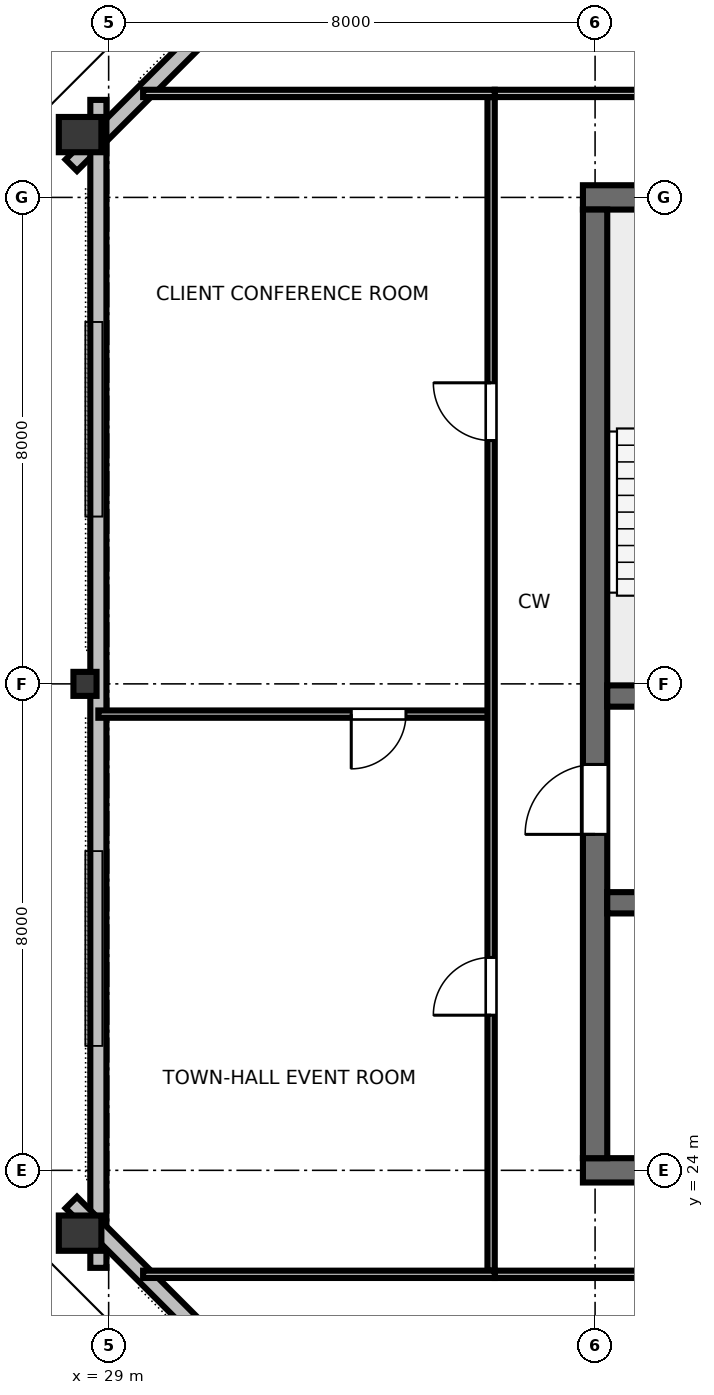
"""IFC4 building model, lengths in metres.
Left out: names, types, materials, properties, quantities, classifications, styles, units other than length and angle.
Written with IfcOpenShell. Run it as: python <this file> out.ifc"""

import sys

from ifc_helpers import new_model, si_unit, direction, frame, frame_2d, origin, origin_2d, place, context, subcontext, project, spatial, rectangle, hollow_rectangle, i_section, extrude, element, fill, save


model = new_model("IFC4")
c1 = context("Model", 3, precision=1e-05, world=origin(), true_north=direction((0.0, 1.0)))
c2 = subcontext(c1, "Body", "Model", "MODEL_VIEW")
j1 = project(units=[si_unit("LENGTHUNIT", "METRE"), si_unit("PLANEANGLEUNIT", "RADIAN")], contexts=[c1])
p1 = place(None, origin())
s1 = spatial("IfcSite", under=j1, at=p1, CompositionType="ELEMENT")
p2 = place(p1, origin())
s2 = spatial("IfcBuilding", under=s1, at=p2, CompositionType="ELEMENT")
p3 = place(p2, frame((0.0, 0.0, 271.8)))
s3 = spatial("IfcBuildingStorey", under=s2, at=p3, CompositionType="ELEMENT", Elevation=271.8)
p4 = place(p3, frame((36.8, 24.0, 0.0), z_axis=(0.0, 0.0, 1.0), x_axis=(1.0, 0.0, 0.0)))
e1 = element("IfcWall", 1, at=p4, inside=s3, PredefinedType="SHEAR", context=c2, shape_type="SweptSolid", body=[
    extrude(rectangle(XDim=18.4, YDim=0.4, at=frame_2d((9.2, 0.0))), origin(), (0.0, 0.0, 1.0), 3.36),
])
p5 = place(p4, frame((13.4, 0.0, 0.0)))
e2 = element("IfcOpeningElement", 2, at=p5, cuts=e1, PredefinedType="OPENING", context=c2, shape_type="SweptSolid", body=[
    extrude(rectangle(XDim=1.6, YDim=2.15, at=frame_2d((0.8, 1.075))), frame((0.0, 0.21, 0.0), z_axis=(0.0, -1.0, 0.0), x_axis=(1.0, 0.0, 0.0)), (0.0, 0.0, 1.0), 0.42),
])
p6 = place(p3, frame((36.8, 40.0, 0.0), z_axis=(0.0, 0.0, 1.0), x_axis=(1.0, 0.0, 0.0)))
e3 = element("IfcWall", 3, at=p6, inside=s3, PredefinedType="SHEAR", context=c2, shape_type="SweptSolid", body=[
    extrude(rectangle(XDim=18.4, YDim=0.4, at=frame_2d((9.2, 0.0))), origin(), (0.0, 0.0, 1.0), 3.36),
])
p7 = place(p6, frame((8.7, 0.0, 0.0)))
e4 = element("IfcOpeningElement", 4, at=p7, cuts=e3, PredefinedType="OPENING", context=c2, shape_type="SweptSolid", body=[
    extrude(rectangle(XDim=1.0, YDim=2.15, at=frame_2d((0.5, 1.075))), frame((0.0, 0.21, 0.0), z_axis=(0.0, -1.0, 0.0), x_axis=(1.0, 0.0, 0.0)), (0.0, 0.0, 1.0), 0.42),
])
p8 = place(p3, frame((37.0, 24.2, 0.0), z_axis=(0.0, 0.0, 1.0), x_axis=(0.0, 1.0, 0.0)))
e5 = element("IfcWall", 5, at=p8, inside=s3, PredefinedType="SHEAR", context=c2, shape_type="SweptSolid", body=[
    extrude(rectangle(XDim=15.6, YDim=0.4, at=frame_2d((7.8, 0.0))), origin(), (0.0, 0.0, 1.0), 3.36),
])
p9 = place(p8, frame((5.325, 0.0, 0.0)))
e6 = element("IfcOpeningElement", 6, at=p9, cuts=e5, PredefinedType="OPENING", context=c2, shape_type="SweptSolid", body=[
    extrude(rectangle(XDim=1.15, YDim=2.15, at=frame_2d((0.575, 1.075))), frame((0.0, 0.21, 0.0), z_axis=(0.0, -1.0, 0.0), x_axis=(1.0, 0.0, 0.0)), (0.0, 0.0, 1.0), 0.42),
])
p10 = place(p3, frame((37.2, 31.8, 0.0), z_axis=(0.0, 0.0, 1.0), x_axis=(1.0, 0.0, 0.0)))
e7 = element("IfcWall", 7, at=p10, inside=s3, PredefinedType="SHEAR", context=c2, shape_type="SweptSolid", body=[
    extrude(rectangle(XDim=17.6, YDim=0.35, at=frame_2d((8.8, 0.0))), origin(), (0.0, 0.0, 1.0), 3.36),
])
p11 = place(p10, frame((0.85, 0.0, 0.0)))
e8 = element("IfcOpeningElement", 8, at=p11, cuts=e7, PredefinedType="OPENING", context=c2, shape_type="SweptSolid", body=[
    extrude(rectangle(XDim=1.1, YDim=2.15, at=frame_2d((0.55, 1.075))), frame((0.0, 0.185, 0.0), z_axis=(0.0, -1.0, 0.0), x_axis=(1.0, 0.0, 0.0)), (0.0, 0.0, 1.0), 0.37),
])
p12 = place(p10, frame((14.75, 0.0, 0.0)))
e9 = element("IfcOpeningElement", 9, at=p12, cuts=e7, PredefinedType="OPENING", context=c2, shape_type="SweptSolid", body=[
    extrude(rectangle(XDim=1.1, YDim=2.15, at=frame_2d((0.55, 1.075))), frame((0.0, 0.185, 0.0), z_axis=(0.0, -1.0, 0.0), x_axis=(1.0, 0.0, 0.0)), (0.0, 0.0, 1.0), 0.37),
])
p13 = place(p3, frame((37.2, 28.4, 0.0), z_axis=(0.0, 0.0, 1.0), x_axis=(1.0, 0.0, 0.0)))
e10 = element("IfcWall", 10, at=p13, inside=s3, PredefinedType="SHEAR", context=c2, shape_type="SweptSolid", body=[
    extrude(rectangle(XDim=17.6, YDim=0.35, at=frame_2d((8.8, 0.0))), origin(), (0.0, 0.0, 1.0), 3.36),
])
p14 = place(p3, frame((28.531, 41.033, 0.0), z_axis=(0.0, 0.0, 1.0), x_axis=(0.0, 1.0, 0.0)))
e11 = element("IfcColumn", 11, at=p14, inside=s3, PredefinedType="COLUMN", context=c2, shape_type="SweptSolid", body=[
    extrude(hollow_rectangle(XDim=0.58, YDim=0.7, WallThickness=0.032, at=origin_2d()), origin(), (0.0, 0.0, 1.0), 3.373),
])
p15 = place(p3, frame((28.611, 32.0, 0.0), z_axis=(0.0, 0.0, 1.0), x_axis=(0.0, 1.0, 0.0)))
e12 = element("IfcColumn", 12, at=p15, inside=s3, PredefinedType="COLUMN", context=c2, shape_type="SweptSolid", body=[
    extrude(i_section(OverallWidth=0.395, OverallDepth=0.38, WebThickness=0.019, FlangeThickness=0.03, FilletRadius=0.025, at=origin_2d()), origin(), (0.0, 0.0, 1.0), 3.373),
])
p16 = place(p3, frame((28.531, 22.967, 0.0), z_axis=(0.0, 0.0, 1.0), x_axis=(0.0, 1.0, 0.0)))
e13 = element("IfcColumn", 13, at=p16, inside=s3, PredefinedType="COLUMN", context=c2, shape_type="SweptSolid", body=[
    extrude(hollow_rectangle(XDim=0.58, YDim=0.7, WallThickness=0.032, at=origin_2d()), origin(), (0.0, 0.0, 1.0), 3.373),
])
p17 = place(p3, frame((36.253, 48.396, 0.0), z_axis=(0.0, 0.0, 1.0), x_axis=(-0.707106781187, -0.707106781187, 0.0)))
e14 = element("IfcWall", 14, at=p17, inside=s3, PredefinedType="STANDARD", context=c2, shape_type="SweptSolid", body=[
    extrude(rectangle(XDim=11.125, YDim=0.265, at=frame_2d((5.562, 0.0))), origin(), (0.0, 0.0, 1.0), 2.832),
])
p18 = place(p3, frame((28.831, 41.604, 0.0), z_axis=(0.0, 0.0, 1.0), x_axis=(0.0, -1.0, 0.0)))
e15 = element("IfcWall", 15, at=p18, inside=s3, PredefinedType="STANDARD", context=c2, shape_type="SweptSolid", body=[
    extrude(rectangle(XDim=19.207, YDim=0.265, at=frame_2d((9.604, 0.0))), origin(), (0.0, 0.0, 1.0), 2.832),
])
p19 = place(p3, frame((28.386, 23.471, 0.0), z_axis=(0.0, 0.0, 1.0), x_axis=(0.707106781187, -0.707106781187, 0.0)))
e16 = element("IfcWall", 16, at=p19, inside=s3, PredefinedType="STANDARD", context=c2, shape_type="SweptSolid", body=[
    extrude(rectangle(XDim=11.125, YDim=0.265, at=frame_2d((5.562, 0.0))), origin(), (0.0, 0.0, 1.0), 2.832),
])
p20 = place(p3, frame((35.35, 22.29, 0.0), z_axis=(0.0, 0.0, 1.0), x_axis=(1.0, 0.0, 0.0)))
e17 = element("IfcWall", 17, at=p20, inside=s3, PredefinedType="PARTITIONING", context=c2, shape_type="SweptSolid", body=[
    extrude(rectangle(XDim=21.3, YDim=0.12, at=frame_2d((10.65, 0.0))), origin(), (0.0, 0.0, 1.0), 2.655),
])
p21 = place(p20, frame((3.679, 0.0, 0.0)))
e18 = element("IfcOpeningElement", 18, at=p21, cuts=e17, PredefinedType="OPENING", context=c2, shape_type="SweptSolid", body=[
    extrude(rectangle(XDim=0.95, YDim=2.15, at=frame_2d((0.475, 1.075))), frame((0.0, 0.07, 0.0), z_axis=(0.0, -1.0, 0.0), x_axis=(1.0, 0.0, 0.0)), (0.0, 0.0, 1.0), 0.14),
])
p22 = place(p20, frame((16.191, 0.0, 0.0)))
e19 = element("IfcOpeningElement", 19, at=p22, cuts=e17, PredefinedType="OPENING", context=c2, shape_type="SweptSolid", body=[
    extrude(rectangle(XDim=0.95, YDim=2.15, at=frame_2d((0.475, 1.075))), frame((0.0, 0.07, 0.0), z_axis=(0.0, -1.0, 0.0), x_axis=(1.0, 0.0, 0.0)), (0.0, 0.0, 1.0), 0.14),
])
p23 = place(p3, frame((35.35, 41.71, 0.0), z_axis=(0.0, 0.0, 1.0), x_axis=(1.0, 0.0, 0.0)))
e20 = element("IfcWall", 20, at=p23, inside=s3, PredefinedType="PARTITIONING", context=c2, shape_type="SweptSolid", body=[
    extrude(rectangle(XDim=21.3, YDim=0.12, at=frame_2d((10.65, 0.0))), origin(), (0.0, 0.0, 1.0), 2.655),
])
p24 = place(p23, frame((4.425, 0.0, 0.0)))
e21 = element("IfcOpeningElement", 21, at=p24, cuts=e20, PredefinedType="OPENING", context=c2, shape_type="SweptSolid", body=[
    extrude(rectangle(XDim=0.95, YDim=2.15, at=frame_2d((0.475, 1.075))), frame((0.0, 0.07, 0.0), z_axis=(0.0, -1.0, 0.0), x_axis=(1.0, 0.0, 0.0)), (0.0, 0.0, 1.0), 0.14),
])
p25 = place(p23, frame((15.925, 0.0, 0.0)))
e22 = element("IfcOpeningElement", 22, at=p25, cuts=e20, PredefinedType="OPENING", context=c2, shape_type="SweptSolid", body=[
    extrude(rectangle(XDim=0.95, YDim=2.15, at=frame_2d((0.475, 1.075))), frame((0.0, 0.07, 0.0), z_axis=(0.0, -1.0, 0.0), x_axis=(1.0, 0.0, 0.0)), (0.0, 0.0, 1.0), 0.14),
])
p26 = place(p3, frame((35.29, 31.503, 0.0), z_axis=(0.0, 0.0, 1.0), x_axis=(-1.0, 0.0, 0.0)))
e23 = element("IfcWall", 23, at=p26, inside=s3, PredefinedType="PARTITIONING", context=c2, shape_type="SweptSolid", body=[
    extrude(rectangle(XDim=6.459, YDim=0.12, at=frame_2d((3.229, 0.0))), origin(), (0.0, 0.0, 1.0), 2.655),
])
p27 = place(p26, frame((1.4, 0.0, 0.0)))
e24 = element("IfcOpeningElement", 24, at=p27, cuts=e23, PredefinedType="OPENING", context=c2, shape_type="SweptSolid", body=[
    extrude(rectangle(XDim=0.9, YDim=2.15, at=frame_2d((0.45, 1.075))), frame((0.0, 0.07, 0.0), z_axis=(0.0, -1.0, 0.0), x_axis=(1.0, 0.0, 0.0)), (0.0, 0.0, 1.0), 0.14),
])
p28 = place(p3, frame((35.29, 22.35, 0.0), z_axis=(0.0, 0.0, 1.0), x_axis=(0.0, 1.0, 0.0)))
e25 = element("IfcWall", 25, at=p28, inside=s3, PredefinedType="PARTITIONING", context=c2, shape_type="SweptSolid", body=[
    extrude(rectangle(XDim=19.3, YDim=0.12, at=frame_2d((9.65, 0.0))), origin(), (0.0, 0.0, 1.0), 2.655),
])
p29 = place(p28, frame((4.201, 0.0, 0.0)))
e26 = element("IfcOpeningElement", 26, at=p29, cuts=e25, PredefinedType="OPENING", context=c2, shape_type="SweptSolid", body=[
    extrude(rectangle(XDim=0.95, YDim=2.15, at=frame_2d((0.475, 1.075))), frame((0.0, 0.07, 0.0), z_axis=(0.0, -1.0, 0.0), x_axis=(1.0, 0.0, 0.0)), (0.0, 0.0, 1.0), 0.14),
])
p30 = place(p28, frame((13.651, 0.0, 0.0)))
e27 = element("IfcOpeningElement", 27, at=p30, cuts=e25, PredefinedType="OPENING", context=c2, shape_type="SweptSolid", body=[
    extrude(rectangle(XDim=0.95, YDim=2.15, at=frame_2d((0.475, 1.075))), frame((0.0, 0.07, 0.0), z_axis=(0.0, -1.0, 0.0), x_axis=(1.0, 0.0, 0.0)), (0.0, 0.0, 1.0), 0.14),
])
for number, where, z_axis, x_axis in (
    (28, (35.35, 22.29, 0.0), (0.0, 0.0, 1.0), (-1.0, 0.0, 0.0)),
    (29, (35.35, 41.71, 0.0), (0.0, 0.0, 1.0), (-1.0, 0.0, 0.0)),
):
    element("IfcWall", number, at=place(p3, frame(where, z_axis=z_axis, x_axis=x_axis)), inside=s3, PredefinedType="PARTITIONING", context=c2, shape_type="SweptSolid", body=[
        extrude(rectangle(XDim=5.783, YDim=0.12, at=frame_2d((2.892, 0.0))), origin(), (0.0, 0.0, 1.0), 2.655),
    ])
p31 = place(p9, origin())
e30 = element("IfcDoor", 30, at=p31, inside=s3, OperationType="SINGLE_SWING_LEFT", PredefinedType="DOOR", context=c2, shape_type="SweptSolid", body=[
    extrude(rectangle(XDim=1.15, YDim=2.15, at=frame_2d((0.575, 1.075))), frame((0.0, 0.025, 0.0), z_axis=(0.0, -1.0, 0.0), x_axis=(1.0, 0.0, 0.0)), (0.0, 0.0, 1.0), 0.05),
])
fill(e6, e30)
p32 = place(p27, origin())
e31 = element("IfcDoor", 31, at=p32, inside=s3, OperationType="SINGLE_SWING_RIGHT", PredefinedType="DOOR", context=c2, shape_type="SweptSolid", body=[
    extrude(rectangle(XDim=0.9, YDim=2.15, at=frame_2d((0.45, 1.075))), frame((0.0, 0.025, 0.0), z_axis=(0.0, -1.0, 0.0), x_axis=(1.0, 0.0, 0.0)), (0.0, 0.0, 1.0), 0.05),
])
fill(e24, e31)
p33 = place(p29, origin())
e32 = element("IfcDoor", 32, at=p33, inside=s3, OperationType="SINGLE_SWING_LEFT", PredefinedType="DOOR", context=c2, shape_type="SweptSolid", body=[
    extrude(rectangle(XDim=0.95, YDim=2.15, at=frame_2d((0.475, 1.075))), frame((0.0, 0.025, 0.0), z_axis=(0.0, -1.0, 0.0), x_axis=(1.0, 0.0, 0.0)), (0.0, 0.0, 1.0), 0.05),
])
fill(e26, e32)
p34 = place(p30, origin())
e33 = element("IfcDoor", 33, at=p34, inside=s3, OperationType="SINGLE_SWING_RIGHT", PredefinedType="DOOR", context=c2, shape_type="SweptSolid", body=[
    extrude(rectangle(XDim=0.95, YDim=2.15, at=frame_2d((0.475, 1.075))), frame((0.0, 0.025, 0.0), z_axis=(0.0, -1.0, 0.0), x_axis=(1.0, 0.0, 0.0)), (0.0, 0.0, 1.0), 0.05),
])
fill(e27, e33)
save(model, sys.argv[1])
